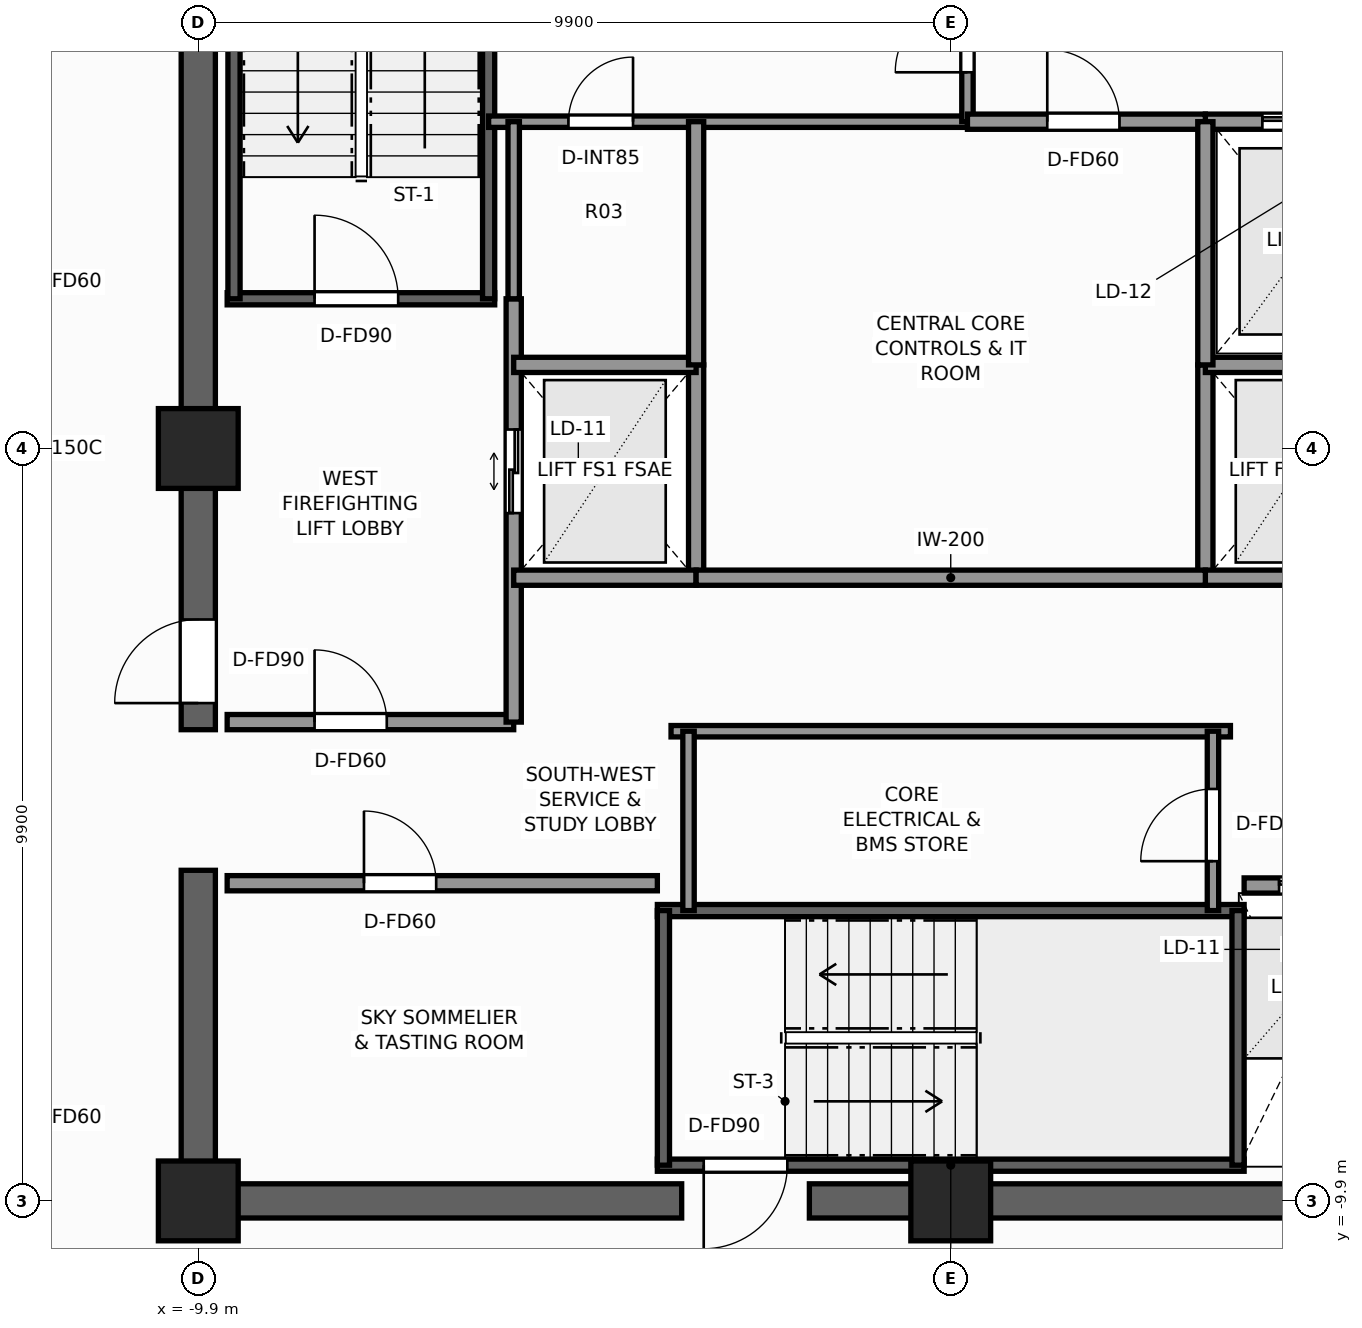
"""IFC4 building model, lengths in metres.
Left out: names, types, materials, properties, quantities, classifications, styles, units other than length and angle.
Written with IfcOpenShell. Run it as: python <this file> out.ifc"""

import sys

from ifc_helpers import new_model, si_unit, direction, frame, frame_2d, origin, origin_2d, place, context, subcontext, project, spatial, rectangle, extrude, element, fill, save


model = new_model("IFC4")
c1 = context("Model", 3, precision=1e-05, world=origin(), true_north=direction((0.0, 1.0)))
c2 = subcontext(c1, "Body", "Model", "MODEL_VIEW")
j1 = project(units=[si_unit("LENGTHUNIT", "METRE"), si_unit("PLANEANGLEUNIT", "RADIAN")], contexts=[c1])
p1 = place(None, origin())
s1 = spatial("IfcSite", under=j1, at=p1, CompositionType="ELEMENT")
p2 = place(p1, origin())
s2 = spatial("IfcBuilding", under=s1, at=p2, CompositionType="ELEMENT")
p3 = place(p2, frame((0.0, 0.0, 229.5)))
s3 = spatial("IfcBuildingStorey", under=s2, at=p3, CompositionType="ELEMENT", Elevation=229.5)
p4 = place(p3, frame((10.125, -9.9, 0.0), z_axis=(0.0, 0.0, 1.0), x_axis=(-1.0, 0.0, 0.0)))
e1 = element("IfcWall", 1, at=p4, inside=s3, PredefinedType="SHEAR", context=c2, shape_type="SweptSolid", body=[
    extrude(rectangle(XDim=11.985, YDim=0.45, at=frame_2d((5.993, 0.0))), origin(), (0.0, 0.0, 1.0), 3.3),
])
p5 = place(p3, frame((-3.54, -9.9, 0.0), z_axis=(0.0, 0.0, 1.0), x_axis=(-1.0, 0.0, 0.0)))
e2 = element("IfcWall", 2, at=p5, inside=s3, PredefinedType="SHEAR", context=c2, shape_type="SweptSolid", body=[
    extrude(rectangle(XDim=6.585, YDim=0.45, at=frame_2d((3.292, 0.0))), origin(), (0.0, 0.0, 1.0), 3.3),
])
p6 = place(p3, frame((-9.9, -9.675, 0.0), z_axis=(0.0, 0.0, 1.0), x_axis=(0.0, 1.0, 0.0)))
e3 = element("IfcWall", 3, at=p6, inside=s3, PredefinedType="SHEAR", context=c2, shape_type="SweptSolid", body=[
    extrude(rectangle(XDim=4.125, YDim=0.45, at=frame_2d((2.062, 0.0))), origin(), (0.0, 0.0, 1.0), 3.3),
])
p7 = place(p3, frame((-9.9, -3.7, 0.0), z_axis=(0.0, 0.0, 1.0), x_axis=(0.0, 1.0, 0.0)))
e4 = element("IfcWall", 4, at=p7, inside=s3, PredefinedType="SHEAR", context=c2, shape_type="SweptSolid", body=[
    extrude(rectangle(XDim=13.375, YDim=0.45, at=frame_2d((6.688, 0.0))), origin(), (0.0, 0.0, 1.0), 3.3),
])
p8 = place(p7, frame((0.35, 0.0, 0.0)))
e5 = element("IfcOpeningElement", 5, at=p8, cuts=e4, PredefinedType="OPENING", context=c2, shape_type="SweptSolid", body=[
    extrude(rectangle(XDim=1.1, YDim=2.2, at=frame_2d((0.55, 1.1))), frame((0.0, 0.235, 0.0), z_axis=(0.0, -1.0, 0.0), x_axis=(1.0, 0.0, 0.0)), (0.0, 0.0, 1.0), 0.47),
])
for number, where, z_axis, x_axis in (
    (6, (-9.9, -9.9, 0.0), (0.0, 0.0, 1.0), (1.0, 0.0, 0.0)),
    (7, (0.0, -9.9, 0.0), (0.0, 0.0, 1.0), (1.0, 0.0, 0.0)),
    (8, (-9.9, 0.0, 0.0), (0.0, 0.0, 1.0), (1.0, 0.0, 0.0)),
):
    element("IfcColumn", number, at=place(p3, frame(where, z_axis=z_axis, x_axis=x_axis)), inside=s3, PredefinedType="COLUMN", context=c2, shape_type="SweptSolid", body=[
        extrude(rectangle(XDim=1.05, YDim=1.05, at=origin_2d()), origin(), (0.0, 0.0, 1.0), 3.3),
    ])
p9 = place(p3, frame((-9.52, 1.97, 0.0), z_axis=(0.0, 0.0, 1.0), x_axis=(1.0, 0.0, 0.0)))
e9 = element("IfcWall", 9, at=p9, inside=s3, PredefinedType="SHEAR", context=c2, shape_type="SweptSolid", body=[
    extrude(rectangle(XDim=3.52, YDim=0.16, at=frame_2d((1.76, 0.0))), origin(), (0.0, 0.0, 1.0), 3.3),
])
p10 = place(p9, frame((1.15, 0.0, 0.0)))
e10 = element("IfcOpeningElement", 10, at=p10, cuts=e9, PredefinedType="OPENING", context=c2, shape_type="SweptSolid", body=[
    extrude(rectangle(XDim=1.1, YDim=2.2, at=frame_2d((0.55, 1.1))), frame((0.0, 0.09, 0.0), z_axis=(0.0, -1.0, 0.0), x_axis=(1.0, 0.0, 0.0)), (0.0, 0.0, 1.0), 0.18),
])
for number, where, z_axis, x_axis in (
    (11, (-9.43, 1.97, 0.0), (0.0, 0.0, 1.0), (0.0, 1.0, 0.0)),
    (12, (-6.08, 1.97, 0.0), (0.0, 0.0, 1.0), (0.0, 1.0, 0.0)),
):
    element("IfcWall", number, at=place(p3, frame(where, z_axis=z_axis, x_axis=x_axis)), inside=s3, PredefinedType="SHEAR", context=c2, shape_type="SweptSolid", body=[
        extrude(rectangle(XDim=7.56, YDim=0.16, at=frame_2d((3.78, 0.0))), origin(), (0.0, 0.0, 1.0), 3.3),
    ])
p11 = place(p3, frame((3.86, -9.43, 0.0), z_axis=(0.0, 0.0, 1.0), x_axis=(-1.0, 0.0, 0.0)))
e13 = element("IfcWall", 13, at=p11, inside=s3, PredefinedType="SHEAR", context=c2, shape_type="SweptSolid", body=[
    extrude(rectangle(XDim=7.72, YDim=0.16, at=frame_2d((3.86, 0.0))), origin(), (0.0, 0.0, 1.0), 3.3),
])
p12 = place(p11, frame((6.01, 0.0, 0.0)))
e14 = element("IfcOpeningElement", 14, at=p12, cuts=e13, PredefinedType="OPENING", context=c2, shape_type="SweptSolid", body=[
    extrude(rectangle(XDim=1.1, YDim=2.2, at=frame_2d((0.55, 1.1))), frame((0.0, 0.09, 0.0), z_axis=(0.0, -1.0, 0.0), x_axis=(1.0, 0.0, 0.0)), (0.0, 0.0, 1.0), 0.18),
])
p13 = place(p3, frame((-3.86, -6.08, 0.0), z_axis=(0.0, 0.0, 1.0), x_axis=(1.0, 0.0, 0.0)))
e15 = element("IfcWall", 15, at=p13, inside=s3, PredefinedType="SHEAR", context=c2, shape_type="SweptSolid", body=[
    extrude(rectangle(XDim=7.72, YDim=0.16, at=frame_2d((3.86, 0.0))), origin(), (0.0, 0.0, 1.0), 3.3),
])
for number, where, z_axis, x_axis in (
    (16, (-3.78, -9.43, 0.0), (0.0, 0.0, 1.0), (0.0, 1.0, 0.0)),
    (17, (3.78, -9.43, 0.0), (0.0, 0.0, 1.0), (0.0, 1.0, 0.0)),
):
    element("IfcWall", number, at=place(p3, frame(where, z_axis=z_axis, x_axis=x_axis)), inside=s3, PredefinedType="SHEAR", context=c2, shape_type="SweptSolid", body=[
        extrude(rectangle(XDim=3.35, YDim=0.16, at=frame_2d((1.675, 0.0))), origin(), (0.0, 0.0, 1.0), 3.3),
    ])
p14 = place(p3, frame((-9.52, -3.6, 0.0), z_axis=(0.0, 0.0, 1.0), x_axis=(1.0, 0.0, 0.0)))
e18 = element("IfcWall", 18, at=p14, inside=s3, PredefinedType="SOLIDWALL", context=c2, shape_type="SweptSolid", body=[
    extrude(rectangle(XDim=3.77, YDim=0.2, at=frame_2d((1.885, 0.0))), origin(), (0.0, 0.0, 1.0), 2.95),
])
p15 = place(p14, frame((1.15, 0.0, 0.0)))
e19 = element("IfcOpeningElement", 19, at=p15, cuts=e18, PredefinedType="OPENING", context=c2, shape_type="SweptSolid", body=[
    extrude(rectangle(XDim=0.95, YDim=2.06, at=frame_2d((0.475, 1.03))), frame((0.0, 0.11, 0.0), z_axis=(0.0, -1.0, 0.0), x_axis=(1.0, 0.0, 0.0)), (0.0, 0.0, 1.0), 0.22),
])
p16 = place(p3, frame((-5.75, -3.6, 0.0), z_axis=(0.0, 0.0, 1.0), x_axis=(0.0, 1.0, 0.0)))
e20 = element("IfcWall", 20, at=p16, inside=s3, PredefinedType="SOLIDWALL", context=c2, shape_type="SweptSolid", body=[
    extrude(rectangle(XDim=5.57, YDim=0.2, at=frame_2d((2.785, 0.0))), origin(), (0.0, 0.0, 1.0), 2.95),
])
p17 = place(p16, frame((2.75, 0.0, 0.0)))
e21 = element("IfcOpeningElement", 21, at=p17, cuts=e20, PredefinedType="OPENING", context=c2, shape_type="SweptSolid", body=[
    extrude(rectangle(XDim=1.1, YDim=2.2, at=frame_2d((0.55, 1.1))), frame((0.0, 0.11, 0.0), z_axis=(0.0, -1.0, 0.0), x_axis=(1.0, 0.0, 0.0)), (0.0, 0.0, 1.0), 0.22),
])
p18 = place(p3, frame((-3.35, -1.7, 0.0), z_axis=(0.0, 0.0, 1.0), x_axis=(0.0, 1.0, 0.0)))
e22 = element("IfcWall", 22, at=p18, inside=s3, PredefinedType="SOLIDWALL", context=c2, shape_type="SweptSolid", body=[
    extrude(rectangle(XDim=2.8, YDim=0.2, at=frame_2d((1.4, 0.0))), origin(), (0.0, 0.0, 1.0), 2.95),
])
for number, where, z_axis, x_axis in (
    (23, (-5.75, -1.7, 0.0), (0.0, 0.0, 1.0), (1.0, 0.0, 0.0)),
    (24, (-5.75, 1.1, 0.0), (0.0, 0.0, 1.0), (1.0, 0.0, 0.0)),
):
    element("IfcWall", number, at=place(p3, frame(where, z_axis=z_axis, x_axis=x_axis)), inside=s3, PredefinedType="SOLIDWALL", context=c2, shape_type="SweptSolid", body=[
        extrude(rectangle(XDim=2.4, YDim=0.2, at=frame_2d((1.2, 0.0))), origin(), (0.0, 0.0, 1.0), 2.95),
    ])
p19 = place(p3, frame((3.35, -1.7, 0.0), z_axis=(0.0, 0.0, 1.0), x_axis=(0.0, 1.0, 0.0)))
e25 = element("IfcWall", 25, at=p19, inside=s3, PredefinedType="SOLIDWALL", context=c2, shape_type="SweptSolid", body=[
    extrude(rectangle(XDim=2.8, YDim=0.2, at=frame_2d((1.4, 0.0))), origin(), (0.0, 0.0, 1.0), 2.95),
])
for number, where, z_axis, x_axis in (
    (26, (3.35, -1.7, 0.0), (0.0, 0.0, 1.0), (1.0, 0.0, 0.0)),
    (27, (3.35, 1.1, 0.0), (0.0, 0.0, 1.0), (1.0, 0.0, 0.0)),
):
    element("IfcWall", number, at=place(p3, frame(where, z_axis=z_axis, x_axis=x_axis)), inside=s3, PredefinedType="SOLIDWALL", context=c2, shape_type="SweptSolid", body=[
        extrude(rectangle(XDim=2.4, YDim=0.2, at=frame_2d((1.2, 0.0))), origin(), (0.0, 0.0, 1.0), 2.95),
    ])
p20 = place(p3, frame((3.35, 4.3, 0.0), z_axis=(0.0, 0.0, 1.0), x_axis=(1.0, 0.0, 0.0)))
e28 = element("IfcWall", 28, at=p20, inside=s3, PredefinedType="SOLIDWALL", context=c2, shape_type="SweptSolid", body=[
    extrude(rectangle(XDim=2.73, YDim=0.2, at=frame_2d((1.365, 0.0))), origin(), (0.0, 0.0, 1.0), 2.95),
])
p21 = place(p20, frame((0.75, 0.0, 0.0)))
e29 = element("IfcOpeningElement", 29, at=p21, cuts=e28, PredefinedType="OPENING", context=c2, shape_type="SweptSolid", body=[
    extrude(rectangle(XDim=1.2, YDim=2.25, at=frame_2d((0.6, 1.125))), frame((0.0, 0.11, 0.0), z_axis=(0.0, -1.0, 0.0), x_axis=(1.0, 0.0, 0.0)), (0.0, 0.0, 1.0), 0.22),
])
p22 = place(p3, frame((-6.08, 4.3, 0.0), z_axis=(0.0, 0.0, 1.0), x_axis=(1.0, 0.0, 0.0)))
e30 = element("IfcWall", 30, at=p22, inside=s3, PredefinedType="PARTITIONING", context=c2, shape_type="SweptSolid", body=[
    extrude(rectangle(XDim=6.3, YDim=0.15, at=frame_2d((3.15, 0.0))), origin(), (0.0, 0.0, 1.0), 2.95),
])
p23 = place(p22, frame((1.05, 0.0, 0.0)))
e31 = element("IfcOpeningElement", 31, at=p23, cuts=e30, PredefinedType="OPENING", context=c2, shape_type="SweptSolid", body=[
    extrude(rectangle(XDim=0.85, YDim=2.03, at=frame_2d((0.425, 1.015))), frame((0.0, 0.085, 0.0), z_axis=(0.0, -1.0, 0.0), x_axis=(1.0, 0.0, 0.0)), (0.0, 0.0, 1.0), 0.17),
])
p24 = place(p3, frame((0.22, 4.3, 0.0), z_axis=(0.0, 0.0, 1.0), x_axis=(0.0, 1.0, 0.0)))
e32 = element("IfcWall", 32, at=p24, inside=s3, PredefinedType="PARTITIONING", context=c2, shape_type="SweptSolid", body=[
    extrude(rectangle(XDim=5.22, YDim=0.15, at=frame_2d((2.61, 0.0))), origin(), (0.0, 0.0, 1.0), 2.95),
])
p25 = place(p24, frame((0.65, 0.0, 0.0)))
e33 = element("IfcOpeningElement", 33, at=p25, cuts=e32, PredefinedType="OPENING", context=c2, shape_type="SweptSolid", body=[
    extrude(rectangle(XDim=0.95, YDim=2.06, at=frame_2d((0.475, 1.03))), frame((0.0, 0.085, 0.0), z_axis=(0.0, -1.0, 0.0), x_axis=(1.0, 0.0, 0.0)), (0.0, 0.0, 1.0), 0.17),
])
p26 = place(p3, frame((-9.52, -5.72, 0.0), z_axis=(0.0, 0.0, 1.0), x_axis=(1.0, 0.0, 0.0)))
e34 = element("IfcWall", 34, at=p26, inside=s3, PredefinedType="SOLIDWALL", context=c2, shape_type="SweptSolid", body=[
    extrude(rectangle(XDim=5.66, YDim=0.2, at=frame_2d((2.83, 0.0))), origin(), (0.0, 0.0, 1.0), 2.95),
])
p27 = place(p26, frame((1.8, 0.0, 0.0)))
e35 = element("IfcOpeningElement", 35, at=p27, cuts=e34, PredefinedType="OPENING", context=c2, shape_type="SweptSolid", body=[
    extrude(rectangle(XDim=0.95, YDim=2.06, at=frame_2d((0.475, 1.03))), frame((0.0, 0.11, 0.0), z_axis=(0.0, -1.0, 0.0), x_axis=(1.0, 0.0, 0.0)), (0.0, 0.0, 1.0), 0.22),
])
p28 = place(p3, frame((3.86, -5.75, 0.0), z_axis=(0.0, 0.0, 1.0), x_axis=(1.0, 0.0, 0.0)))
e36 = element("IfcWall", 36, at=p28, inside=s3, PredefinedType="SOLIDWALL", context=c2, shape_type="SweptSolid", body=[
    extrude(rectangle(XDim=5.66, YDim=0.2, at=frame_2d((2.83, 0.0))), origin(), (0.0, 0.0, 1.0), 2.95),
])
p29 = place(p28, frame((0.46, 0.0, 0.0)))
e37 = element("IfcOpeningElement", 37, at=p29, cuts=e36, PredefinedType="OPENING", context=c2, shape_type="SweptSolid", body=[
    extrude(rectangle(XDim=1.1, YDim=2.2, at=frame_2d((0.55, 1.1))), frame((0.0, 0.11, 0.0), z_axis=(0.0, -1.0, 0.0), x_axis=(1.0, 0.0, 0.0)), (0.0, 0.0, 1.0), 0.22),
])
p30 = place(p28, frame((2.39, 0.0, 0.0)))
e38 = element("IfcOpeningElement", 38, at=p30, cuts=e36, PredefinedType="OPENING", context=c2, shape_type="SweptSolid", body=[
    extrude(rectangle(XDim=1.1, YDim=2.2, at=frame_2d((0.55, 1.1))), frame((0.0, 0.11, 0.0), z_axis=(0.0, -1.0, 0.0), x_axis=(1.0, 0.0, 0.0)), (0.0, 0.0, 1.0), 0.22),
])
p31 = place(p28, frame((4.32, 0.0, 0.0)))
e39 = element("IfcOpeningElement", 39, at=p31, cuts=e36, PredefinedType="OPENING", context=c2, shape_type="SweptSolid", body=[
    extrude(rectangle(XDim=1.1, YDim=2.2, at=frame_2d((0.55, 1.1))), frame((0.0, 0.11, 0.0), z_axis=(0.0, -1.0, 0.0), x_axis=(1.0, 0.0, 0.0)), (0.0, 0.0, 1.0), 0.22),
])
p32 = place(p3, frame((0.22, 4.3, 0.0), z_axis=(0.0, 0.0, 1.0), x_axis=(1.0, 0.0, 0.0)))
e40 = element("IfcWall", 40, at=p32, inside=s3, PredefinedType="SOLIDWALL", context=c2, shape_type="SweptSolid", body=[
    extrude(rectangle(XDim=3.13, YDim=0.2, at=frame_2d((1.565, 0.0))), origin(), (0.0, 0.0, 1.0), 2.95),
])
p33 = place(p32, frame((1.05, 0.0, 0.0)))
e41 = element("IfcOpeningElement", 41, at=p33, cuts=e40, PredefinedType="OPENING", context=c2, shape_type="SweptSolid", body=[
    extrude(rectangle(XDim=0.95, YDim=2.06, at=frame_2d((0.475, 1.03))), frame((0.0, 0.11, 0.0), z_axis=(0.0, -1.0, 0.0), x_axis=(1.0, 0.0, 0.0)), (0.0, 0.0, 1.0), 0.22),
])
p34 = place(p3, frame((-3.35, -1.7, 0.0), z_axis=(0.0, 0.0, 1.0), x_axis=(1.0, 0.0, 0.0)))
e42 = element("IfcWall", 42, at=p34, inside=s3, PredefinedType="SOLIDWALL", context=c2, shape_type="SweptSolid", body=[
    extrude(rectangle(XDim=6.7, YDim=0.2, at=frame_2d((3.35, 0.0))), origin(), (0.0, 0.0, 1.0), 2.95),
])
for number, where, z_axis, x_axis in (
    (43, (-3.35, 1.1, 0.0), (0.0, 0.0, 1.0), (0.0, 1.0, 0.0)),
    (44, (3.35, 1.1, 0.0), (0.0, 0.0, 1.0), (0.0, 1.0, 0.0)),
):
    element("IfcWall", number, at=place(p3, frame(where, z_axis=z_axis, x_axis=x_axis)), inside=s3, PredefinedType="SOLIDWALL", context=c2, shape_type="SweptSolid", body=[
        extrude(rectangle(XDim=3.2, YDim=0.2, at=frame_2d((1.6, 0.0))), origin(), (0.0, 0.0, 1.0), 2.95),
    ])
p35 = place(p3, frame((-3.68, -3.72, 0.0), z_axis=(0.0, 0.0, 1.0), x_axis=(1.0, 0.0, 0.0)))
e45 = element("IfcWall", 45, at=p35, inside=s3, PredefinedType="PARTITIONING", context=c2, shape_type="SweptSolid", body=[
    extrude(rectangle(XDim=7.36, YDim=0.15, at=frame_2d((3.68, 0.0))), origin(), (0.0, 0.0, 1.0), 2.95),
])
p36 = place(p3, frame((3.45, -6.08, 0.0), z_axis=(0.0, 0.0, 1.0), x_axis=(0.0, 1.0, 0.0)))
e46 = element("IfcWall", 46, at=p36, inside=s3, PredefinedType="PARTITIONING", context=c2, shape_type="SweptSolid", body=[
    extrude(rectangle(XDim=2.36, YDim=0.15, at=frame_2d((1.18, 0.0))), origin(), (0.0, 0.0, 1.0), 2.95),
])
p37 = place(p36, frame((0.65, 0.0, 0.0)))
e47 = element("IfcOpeningElement", 47, at=p37, cuts=e46, PredefinedType="OPENING", context=c2, shape_type="SweptSolid", body=[
    extrude(rectangle(XDim=0.95, YDim=2.06, at=frame_2d((0.475, 1.03))), frame((0.0, 0.085, 0.0), z_axis=(0.0, -1.0, 0.0), x_axis=(1.0, 0.0, 0.0)), (0.0, 0.0, 1.0), 0.17),
])
p38 = place(p3, frame((-3.45, -6.08, 0.0), z_axis=(0.0, 0.0, 1.0), x_axis=(0.0, 1.0, 0.0)))
e48 = element("IfcWall", 48, at=p38, inside=s3, PredefinedType="PARTITIONING", context=c2, shape_type="SweptSolid", body=[
    extrude(rectangle(XDim=2.36, YDim=0.15, at=frame_2d((1.18, 0.0))), origin(), (0.0, 0.0, 1.0), 2.95),
])
p39 = place(p3, frame((-5.75, 1.97, 0.0), z_axis=(0.0, 0.0, 1.0), x_axis=(0.0, 1.0, 0.0)))
e49 = element("IfcWall", 49, at=p39, inside=s3, PredefinedType="PARTITIONING", context=c2, shape_type="SweptSolid", body=[
    extrude(rectangle(XDim=2.33, YDim=0.15, at=frame_2d((1.165, 0.0))), origin(), (0.0, 0.0, 1.0), 2.95),
])
p40 = place(p10, origin())
e50 = element("IfcDoor", 50, at=p40, inside=s3, OperationType="SINGLE_SWING_LEFT", PredefinedType="DOOR", context=c2, shape_type="SweptSolid", body=[
    extrude(rectangle(XDim=1.1, YDim=2.2, at=frame_2d((0.55, 1.1))), frame((0.0, 0.025, 0.0), z_axis=(0.0, -1.0, 0.0), x_axis=(1.0, 0.0, 0.0)), (0.0, 0.0, 1.0), 0.05),
])
fill(e10, e50)
p41 = place(p12, origin())
e51 = element("IfcDoor", 51, at=p41, inside=s3, OperationType="SINGLE_SWING_RIGHT", PredefinedType="DOOR", context=c2, shape_type="SweptSolid", body=[
    extrude(rectangle(XDim=1.1, YDim=2.2, at=frame_2d((0.55, 1.1))), frame((0.0, 0.025, 0.0), z_axis=(0.0, -1.0, 0.0), x_axis=(1.0, 0.0, 0.0)), (0.0, 0.0, 1.0), 0.05),
])
fill(e14, e51)
p42 = place(p8, origin())
e52 = element("IfcDoor", 52, at=p42, inside=s3, OperationType="SINGLE_SWING_LEFT", PredefinedType="DOOR", context=c2, shape_type="SweptSolid", body=[
    extrude(rectangle(XDim=1.1, YDim=2.2, at=frame_2d((0.55, 1.1))), frame((0.0, 0.025, 0.0), z_axis=(0.0, -1.0, 0.0), x_axis=(1.0, 0.0, 0.0)), (0.0, 0.0, 1.0), 0.05),
])
fill(e5, e52)
p43 = place(p17, origin())
e53 = element("IfcDoor", 53, at=p43, inside=s3, OperationType="DOUBLE_DOOR_SLIDING", PredefinedType="DOOR", context=c2, shape_type="SweptSolid", body=[
    extrude(rectangle(XDim=1.1, YDim=2.2, at=frame_2d((0.55, 1.1))), frame((0.0, 0.025, 0.0), z_axis=(0.0, -1.0, 0.0), x_axis=(1.0, 0.0, 0.0)), (0.0, 0.0, 1.0), 0.05),
])
fill(e21, e53)
p44 = place(p21, origin())
e54 = element("IfcDoor", 54, at=p44, inside=s3, OperationType="DOUBLE_DOOR_SLIDING", PredefinedType="DOOR", context=c2, shape_type="SweptSolid", body=[
    extrude(rectangle(XDim=1.2, YDim=2.25, at=frame_2d((0.6, 1.125))), frame((0.0, 0.025, 0.0), z_axis=(0.0, -1.0, 0.0), x_axis=(1.0, 0.0, 0.0)), (0.0, 0.0, 1.0), 0.05),
])
fill(e29, e54)
p45 = place(p25, origin())
e55 = element("IfcDoor", 55, at=p45, inside=s3, OperationType="SINGLE_SWING_LEFT", PredefinedType="DOOR", context=c2, shape_type="SweptSolid", body=[
    extrude(rectangle(XDim=0.95, YDim=2.06, at=frame_2d((0.475, 1.03))), frame((0.0, 0.025, 0.0), z_axis=(0.0, -1.0, 0.0), x_axis=(1.0, 0.0, 0.0)), (0.0, 0.0, 1.0), 0.05),
])
fill(e33, e55)
p46 = place(p27, origin())
e56 = element("IfcDoor", 56, at=p46, inside=s3, OperationType="SINGLE_SWING_LEFT", PredefinedType="DOOR", context=c2, shape_type="SweptSolid", body=[
    extrude(rectangle(XDim=0.95, YDim=2.06, at=frame_2d((0.475, 1.03))), frame((0.0, 0.025, 0.0), z_axis=(0.0, -1.0, 0.0), x_axis=(1.0, 0.0, 0.0)), (0.0, 0.0, 1.0), 0.05),
])
fill(e35, e56)
p47 = place(p15, origin())
e57 = element("IfcDoor", 57, at=p47, inside=s3, OperationType="SINGLE_SWING_LEFT", PredefinedType="DOOR", context=c2, shape_type="SweptSolid", body=[
    extrude(rectangle(XDim=0.95, YDim=2.06, at=frame_2d((0.475, 1.03))), frame((0.0, 0.025, 0.0), z_axis=(0.0, -1.0, 0.0), x_axis=(1.0, 0.0, 0.0)), (0.0, 0.0, 1.0), 0.05),
])
fill(e19, e57)
p48 = place(p29, origin())
e58 = element("IfcDoor", 58, at=p48, inside=s3, OperationType="DOUBLE_DOOR_SLIDING", PredefinedType="DOOR", context=c2, shape_type="SweptSolid", body=[
    extrude(rectangle(XDim=1.1, YDim=2.2, at=frame_2d((0.55, 1.1))), frame((0.0, 0.025, 0.0), z_axis=(0.0, -1.0, 0.0), x_axis=(1.0, 0.0, 0.0)), (0.0, 0.0, 1.0), 0.05),
])
fill(e37, e58)
p49 = place(p33, origin())
e59 = element("IfcDoor", 59, at=p49, inside=s3, OperationType="SINGLE_SWING_LEFT", PredefinedType="DOOR", context=c2, shape_type="SweptSolid", body=[
    extrude(rectangle(XDim=0.95, YDim=2.06, at=frame_2d((0.475, 1.03))), frame((0.0, 0.025, 0.0), z_axis=(0.0, -1.0, 0.0), x_axis=(1.0, 0.0, 0.0)), (0.0, 0.0, 1.0), 0.05),
])
fill(e41, e59)
p50 = place(p37, origin())
e60 = element("IfcDoor", 60, at=p50, inside=s3, OperationType="SINGLE_SWING_LEFT", PredefinedType="DOOR", context=c2, shape_type="SweptSolid", body=[
    extrude(rectangle(XDim=0.95, YDim=2.06, at=frame_2d((0.475, 1.03))), frame((0.0, 0.025, 0.0), z_axis=(0.0, -1.0, 0.0), x_axis=(1.0, 0.0, 0.0)), (0.0, 0.0, 1.0), 0.05),
])
fill(e47, e60)
p51 = place(p23, origin())
e61 = element("IfcDoor", 61, at=p51, inside=s3, OperationType="SINGLE_SWING_RIGHT", PredefinedType="DOOR", context=c2, shape_type="SweptSolid", body=[
    extrude(rectangle(XDim=0.85, YDim=2.03, at=frame_2d((0.425, 1.015))), frame((0.0, 0.025, 0.0), z_axis=(0.0, -1.0, 0.0), x_axis=(1.0, 0.0, 0.0)), (0.0, 0.0, 1.0), 0.05),
])
fill(e31, e61)
save(model, sys.argv[1])
